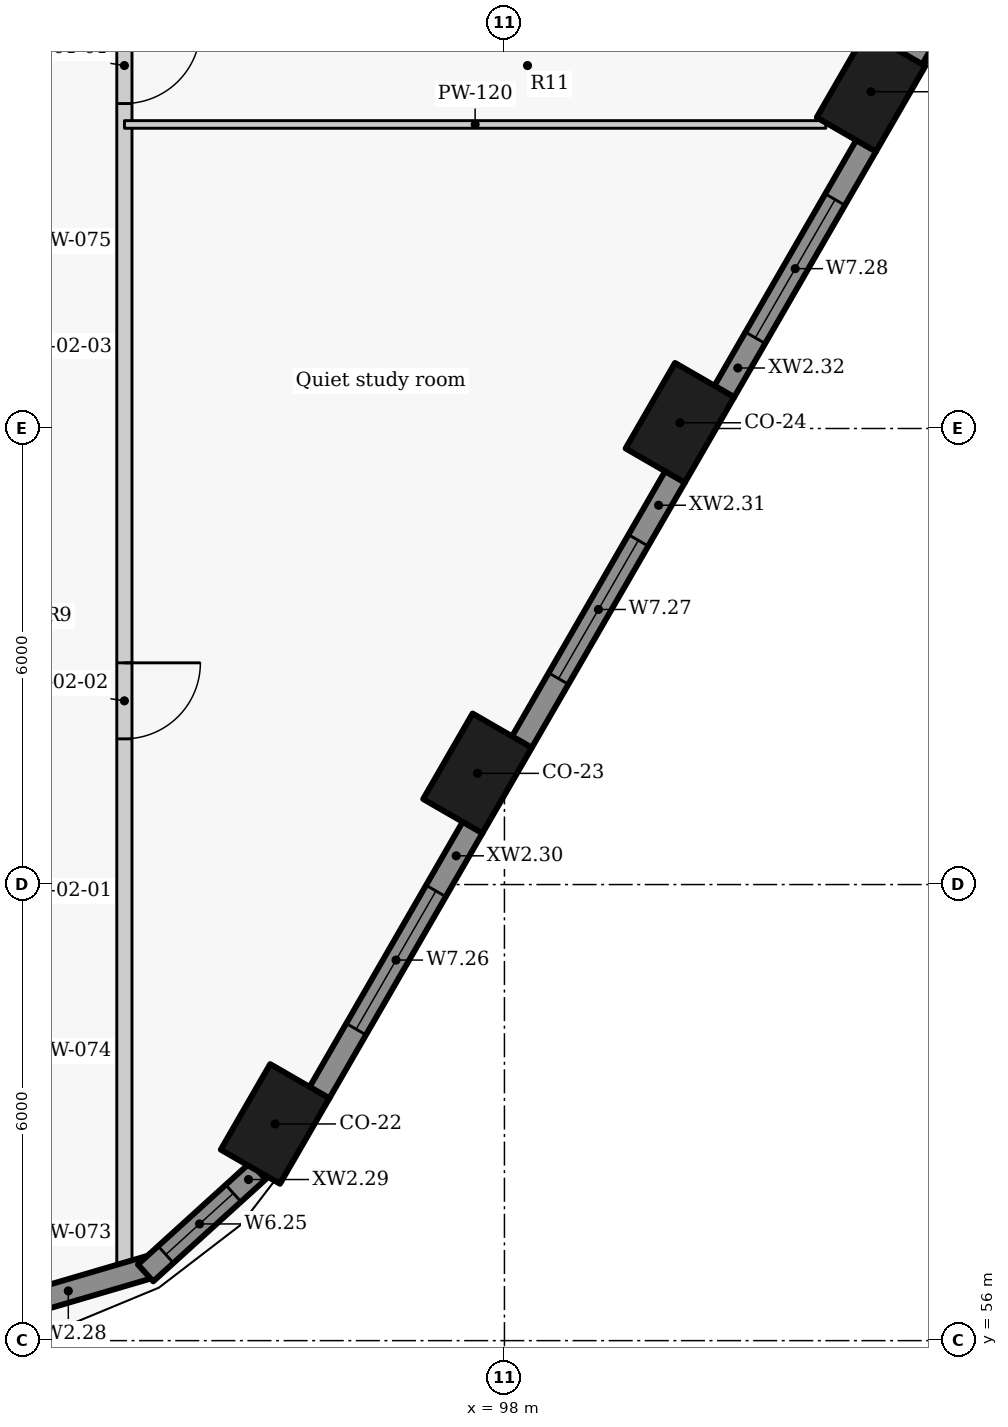
"""IFC4 building model, lengths in metres.
Left out: names, types, materials, properties, quantities, classifications, styles, units other than length and angle.
Written with IfcOpenShell. Run it as: python <this file> out.ifc"""

import sys

from ifc_helpers import new_model, si_unit, direction, frame, frame_2d, origin, origin_2d, place, context, subcontext, project, spatial, rectangle, extrude, element, fill, save


model = new_model("IFC4")
c1 = context("Model", 3, precision=1e-05, world=origin(), true_north=direction((0.0, 1.0)))
c2 = subcontext(c1, "Body", "Model", "MODEL_VIEW")
j1 = project(units=[si_unit("LENGTHUNIT", "METRE"), si_unit("PLANEANGLEUNIT", "RADIAN")], contexts=[c1])
p1 = place(None, origin())
s1 = spatial("IfcSite", under=j1, at=p1, CompositionType="ELEMENT")
p2 = place(p1, origin())
s2 = spatial("IfcBuilding", under=s1, at=p2, CompositionType="ELEMENT")
p3 = place(p2, frame((0.0, 0.0, 160.2)))
s3 = spatial("IfcBuildingStorey", under=s2, at=p3, CompositionType="ELEMENT", Elevation=160.2)
for number, where, z_axis, x_axis in (
    (1, (94.982, 58.851, 0.0), (0.0, 0.0, 1.0), (0.5, 0.866, 0.0)),
    (2, (97.646, 63.463, 0.0), (0.0, 0.0, 1.0), (0.5, 0.866, 0.0)),
    (3, (100.308, 68.075, 0.0), (0.0, 0.0, 1.0), (0.5, 0.866, 0.0)),
    (4, (102.823, 72.43, 0.0), (0.0, 0.0, 1.0), (0.5, 0.866, 0.0)),
):
    element("IfcColumn", number, at=place(p3, frame(where, z_axis=z_axis, x_axis=x_axis)), inside=s3, PredefinedType="COLUMN", context=c2, shape_type="SweptSolid", body=[
        extrude(rectangle(XDim=1.3, YDim=0.9, at=origin_2d()), origin(), (0.0, 0.0, 1.0), 3.3),
    ])
p4 = place(p3, frame((91.153, 56.328, 0.0), z_axis=(0.0, 0.0, 1.0), x_axis=(0.959473072336, 0.281800325517, 0.0)))
e5 = element("IfcWall", 5, at=p4, inside=s3, PredefinedType="SOLIDWALL", context=c2, shape_type="SweptSolid", body=[
    extrude(rectangle(XDim=2.312, YDim=0.3, at=frame_2d((1.156, 0.0))), origin(), (0.0, 0.0, 1.0), 2.425),
])
p5 = place(p3, frame((93.278, 56.89, 0.0), z_axis=(0.0, 0.0, 1.0), x_axis=(0.740652597499, 0.671888182526, 0.0)))
e6 = element("IfcWall", 6, at=p5, inside=s3, PredefinedType="SOLIDWALL", context=c2, shape_type="SweptSolid", body=[
    extrude(rectangle(XDim=1.999, YDim=0.3, at=frame_2d((1.0, 0.0))), origin(), (0.0, 0.0, 1.0), 2.425),
])
p6 = place(p5, frame((0.36, 0.0, 0.9)))
e7 = element("IfcOpeningElement", 7, at=p6, cuts=e6, PredefinedType="OPENING", context=c2, shape_type="SweptSolid", body=[
    extrude(rectangle(XDim=1.2, YDim=1.1, at=frame_2d((0.6, 0.55))), frame((0.0, 0.16, 0.0), z_axis=(0.0, -1.0, 0.0), x_axis=(1.0, 0.0, 0.0)), (0.0, 0.0, 1.0), 0.32),
])
p7 = place(p3, frame((95.565, 59.26, 0.0), z_axis=(0.0, 0.0, 1.0), x_axis=(0.500031546601, 0.86600718958, 0.0)))
e8 = element("IfcWall", 8, at=p7, inside=s3, PredefinedType="SOLIDWALL", context=c2, shape_type="SweptSolid", body=[
    extrude(rectangle(XDim=4.034, YDim=0.3, at=frame_2d((2.017, 0.0))), origin(), (0.0, 0.0, 1.0), 2.425),
])
p8 = place(p7, frame((0.967, 0.0, 0.9)))
e9 = element("IfcOpeningElement", 9, at=p8, cuts=e8, PredefinedType="OPENING", context=c2, shape_type="SweptSolid", body=[
    extrude(rectangle(XDim=2.1, YDim=1.1, at=frame_2d((1.05, 0.55))), frame((0.0, 0.16, 0.0), z_axis=(0.0, -1.0, 0.0), x_axis=(1.0, 0.0, 0.0)), (0.0, 0.0, 1.0), 0.32),
])
p9 = place(p3, frame((98.228, 63.872, 0.0), z_axis=(0.0, 0.0, 1.0), x_axis=(0.500031546601, 0.86600718958, 0.0)))
e10 = element("IfcWall", 10, at=p9, inside=s3, PredefinedType="SOLIDWALL", context=c2, shape_type="SweptSolid", body=[
    extrude(rectangle(XDim=4.034, YDim=0.3, at=frame_2d((2.017, 0.0))), origin(), (0.0, 0.0, 1.0), 2.425),
])
p10 = place(p9, frame((0.967, 0.0, 0.9)))
e11 = element("IfcOpeningElement", 11, at=p10, cuts=e10, PredefinedType="OPENING", context=c2, shape_type="SweptSolid", body=[
    extrude(rectangle(XDim=2.1, YDim=1.1, at=frame_2d((1.05, 0.55))), frame((0.0, 0.16, 0.0), z_axis=(0.0, -1.0, 0.0), x_axis=(1.0, 0.0, 0.0)), (0.0, 0.0, 1.0), 0.32),
])
p11 = place(p3, frame((100.891, 68.485, 0.0), z_axis=(0.0, 0.0, 1.0), x_axis=(0.499933594891, 0.866063739398, 0.0)))
e12 = element("IfcWall", 12, at=p11, inside=s3, PredefinedType="SOLIDWALL", context=c2, shape_type="SweptSolid", body=[
    extrude(rectangle(XDim=3.737, YDim=0.3, at=frame_2d((1.868, 0.0))), origin(), (0.0, 0.0, 1.0), 2.425),
])
p12 = place(p11, frame((0.818, 0.0, 0.9)))
e13 = element("IfcOpeningElement", 13, at=p12, cuts=e12, PredefinedType="OPENING", context=c2, shape_type="SweptSolid", body=[
    extrude(rectangle(XDim=2.1, YDim=1.1, at=frame_2d((1.05, 0.55))), frame((0.0, 0.16, 0.0), z_axis=(0.0, -1.0, 0.0), x_axis=(1.0, 0.0, 0.0)), (0.0, 0.0, 1.0), 0.32),
])
p13 = place(p3, frame((103.366, 72.863, 0.0), z_axis=(0.0, 0.0, 1.0), x_axis=(0.492498306264, 0.87031340236, 0.0)))
e14 = element("IfcWall", 14, at=p13, inside=s3, PredefinedType="SOLIDWALL", context=c2, shape_type="SweptSolid", body=[
    extrude(rectangle(XDim=5.727, YDim=0.3, at=frame_2d((2.863, 0.0))), origin(), (0.0, 0.0, 1.0), 2.425),
])
p14 = place(p13, frame((1.093, 0.0, 0.9)))
e15 = element("IfcOpeningElement", 15, at=p14, cuts=e14, PredefinedType="OPENING", context=c2, shape_type="SweptSolid", body=[
    extrude(rectangle(XDim=1.5, YDim=1.1, at=frame_2d((0.75, 0.55))), frame((0.0, 0.16, 0.0), z_axis=(0.0, -1.0, 0.0), x_axis=(1.0, 0.0, 0.0)), (0.0, 0.0, 1.0), 0.32),
])
p15 = place(p13, frame((3.334, 0.0, 0.9)))
e16 = element("IfcOpeningElement", 16, at=p15, cuts=e14, PredefinedType="OPENING", context=c2, shape_type="SweptSolid", body=[
    extrude(rectangle(XDim=1.5, YDim=1.1, at=frame_2d((0.75, 0.55))), frame((0.0, 0.16, 0.0), z_axis=(0.0, -1.0, 0.0), x_axis=(1.0, 0.0, 0.0)), (0.0, 0.0, 1.0), 0.32),
])
p16 = place(p3, frame((93.0, 102.498, 0.0), z_axis=(0.0, 0.0, 1.0), x_axis=(0.0, -1.0, 0.0)))
e17 = element("IfcWall", 17, at=p16, inside=s3, PredefinedType="PARTITIONING", context=c2, shape_type="SweptSolid", body=[
    extrude(rectangle(XDim=45.665, YDim=0.2, at=frame_2d((22.833, 0.0))), origin(), (0.0, 0.0, 1.0), 2.405),
])
p17 = place(p16, frame((37.581, 0.0, 0.0)))
e18 = element("IfcOpeningElement", 18, at=p17, cuts=e17, PredefinedType="OPENING", context=c2, shape_type="SweptSolid", body=[
    extrude(rectangle(XDim=1.0, YDim=2.1, at=frame_2d((0.5, 1.05))), frame((0.0, 0.11, 0.0), z_axis=(0.0, -1.0, 0.0), x_axis=(1.0, 0.0, 0.0)), (0.0, 0.0, 1.0), 0.22),
])
p18 = place(p16, frame((29.223, 0.0, 0.0)))
e19 = element("IfcOpeningElement", 19, at=p18, cuts=e17, PredefinedType="OPENING", context=c2, shape_type="SweptSolid", body=[
    extrude(rectangle(XDim=1.0, YDim=2.1, at=frame_2d((0.5, 1.05))), frame((0.0, 0.11, 0.0), z_axis=(0.0, -1.0, 0.0), x_axis=(1.0, 0.0, 0.0)), (0.0, 0.0, 1.0), 0.22),
])
p19 = place(p16, frame((19.223, 0.0, 0.0)))
e20 = element("IfcOpeningElement", 20, at=p19, cuts=e17, PredefinedType="OPENING", context=c2, shape_type="SweptSolid", body=[
    extrude(rectangle(XDim=1.0, YDim=2.1, at=frame_2d((0.5, 1.05))), frame((0.0, 0.11, 0.0), z_axis=(0.0, -1.0, 0.0), x_axis=(1.0, 0.0, 0.0)), (0.0, 0.0, 1.0), 0.22),
])
p20 = place(p3, frame((93.001, 72.0, 0.0), z_axis=(0.0, 0.0, 1.0), x_axis=(1.0, 0.0, 0.0)))
e21 = element("IfcWall", 21, at=p20, inside=s3, PredefinedType="PARTITIONING", context=c2, shape_type="SweptSolid", body=[
    extrude(rectangle(XDim=9.227, YDim=0.1, at=frame_2d((4.614, 0.0))), origin(), (0.0, 0.0, 1.0), 3.025),
])
p21 = place(p6, origin())
e22 = element("IfcWindow", 22, at=p21, inside=s3, PartitioningType="SINGLE_PANEL", PredefinedType="WINDOW", context=c2, shape_type="SweptSolid", body=[
    extrude(rectangle(XDim=1.2, YDim=1.1, at=frame_2d((0.6, 0.55))), frame((0.0, 0.03, 0.0), z_axis=(0.0, -1.0, 0.0), x_axis=(1.0, 0.0, 0.0)), (0.0, 0.0, 1.0), 0.06),
])
fill(e7, e22)
p22 = place(p8, origin())
e23 = element("IfcWindow", 23, at=p22, inside=s3, PartitioningType="SINGLE_PANEL", PredefinedType="WINDOW", context=c2, shape_type="SweptSolid", body=[
    extrude(rectangle(XDim=2.1, YDim=1.1, at=frame_2d((1.05, 0.55))), frame((0.0, 0.03, 0.0), z_axis=(0.0, -1.0, 0.0), x_axis=(1.0, 0.0, 0.0)), (0.0, 0.0, 1.0), 0.06),
])
fill(e9, e23)
p23 = place(p10, origin())
e24 = element("IfcWindow", 24, at=p23, inside=s3, PartitioningType="SINGLE_PANEL", PredefinedType="WINDOW", context=c2, shape_type="SweptSolid", body=[
    extrude(rectangle(XDim=2.1, YDim=1.1, at=frame_2d((1.05, 0.55))), frame((0.0, 0.03, 0.0), z_axis=(0.0, -1.0, 0.0), x_axis=(1.0, 0.0, 0.0)), (0.0, 0.0, 1.0), 0.06),
])
fill(e11, e24)
p24 = place(p12, origin())
e25 = element("IfcWindow", 25, at=p24, inside=s3, PartitioningType="SINGLE_PANEL", PredefinedType="WINDOW", context=c2, shape_type="SweptSolid", body=[
    extrude(rectangle(XDim=2.1, YDim=1.1, at=frame_2d((1.05, 0.55))), frame((0.0, 0.03, 0.0), z_axis=(0.0, -1.0, 0.0), x_axis=(1.0, 0.0, 0.0)), (0.0, 0.0, 1.0), 0.06),
])
fill(e13, e25)
p25 = place(p17, origin())
e26 = element("IfcDoor", 26, at=p25, inside=s3, OperationType="SINGLE_SWING_LEFT", PredefinedType="DOOR", context=c2, shape_type="SweptSolid", body=[
    extrude(rectangle(XDim=1.0, YDim=2.1, at=frame_2d((0.5, 1.05))), frame((0.0, 0.025, 0.0), z_axis=(0.0, -1.0, 0.0), x_axis=(1.0, 0.0, 0.0)), (0.0, 0.0, 1.0), 0.05),
])
fill(e18, e26)
p26 = place(p18, origin())
e27 = element("IfcDoor", 27, at=p26, inside=s3, OperationType="SINGLE_SWING_LEFT", PredefinedType="DOOR", context=c2, shape_type="SweptSolid", body=[
    extrude(rectangle(XDim=1.0, YDim=2.1, at=frame_2d((0.5, 1.05))), frame((0.0, 0.025, 0.0), z_axis=(0.0, -1.0, 0.0), x_axis=(1.0, 0.0, 0.0)), (0.0, 0.0, 1.0), 0.05),
])
fill(e19, e27)
save(model, sys.argv[1])
